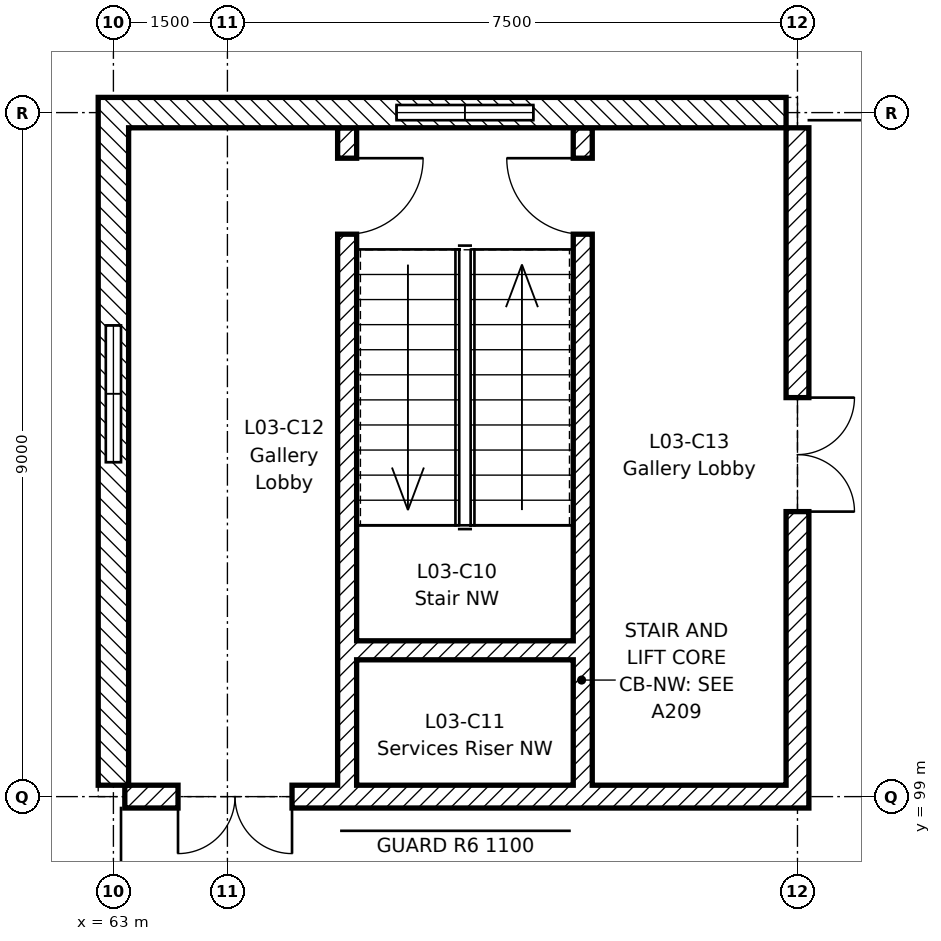
"""IFC4 building model, lengths in metres.
Left out: names, types, materials, properties, quantities, classifications, styles, units other than length and angle.
Written with IfcOpenShell. Run it as: python <this file> out.ifc"""

import sys

from ifc_helpers import new_model, si_unit, direction, frame, frame_2d, origin, place, context, subcontext, project, spatial, rectangle, extrude, element, fill, save


model = new_model("IFC4")
c1 = context("Model", 3, precision=1e-05, world=origin(), true_north=direction((0.0, 1.0)))
c2 = subcontext(c1, "Body", "Model", "MODEL_VIEW")
j1 = project(units=[si_unit("LENGTHUNIT", "METRE"), si_unit("PLANEANGLEUNIT", "RADIAN")], contexts=[c1])
p1 = place(None, origin())
s1 = spatial("IfcSite", under=j1, at=p1, CompositionType="ELEMENT")
p2 = place(p1, origin())
s2 = spatial("IfcBuilding", under=s1, at=p2, CompositionType="ELEMENT")
p3 = place(p2, frame((0.0, 0.0, 14.4)))
s3 = spatial("IfcBuildingStorey", under=s2, at=p3, CompositionType="ELEMENT", Elevation=14.4)
p4 = place(p3, frame((75.322, 98.657, -0.2), z_axis=(0.0, 0.0, 1.0), x_axis=(-0.707106781187, -0.707106781187, 0.0)))
e1 = element("IfcWall", 1, at=p4, inside=s3, PredefinedType="SHEAR", context=c2, shape_type="SweptSolid", body=[
    extrude(rectangle(XDim=4.213, YDim=1.0, at=frame_2d((2.106, 0.0))), origin(), (0.0, 0.0, 1.0), 4.2),
])
p5 = place(p4, frame((1.356, 0.0, 0.2)))
e2 = element("IfcOpeningElement", 2, at=p5, cuts=e1, PredefinedType="OPENING", context=c2, shape_type="SweptSolid", body=[
    extrude(rectangle(XDim=1.5, YDim=2.4, at=frame_2d((0.75, 1.2))), frame((0.0, 0.51, 0.0), z_axis=(0.0, -1.0, 0.0), x_axis=(1.0, 0.0, 0.0)), (0.0, 0.0, 1.0), 1.02),
])
p6 = place(p3, frame((63.15, 99.0, 0.0), z_axis=(0.0, 0.0, 1.0), x_axis=(1.0, 0.0, 0.0)))
e3 = element("IfcWall", 3, at=p6, inside=s3, PredefinedType="SHEAR", context=c2, shape_type="SweptSolid", body=[
    extrude(rectangle(XDim=9.0, YDim=0.3, at=frame_2d((4.5, 0.0))), origin(), (0.0, 0.0, 1.0), 4.0),
])
p7 = place(p6, frame((0.7, 0.0, 0.0)))
e4 = element("IfcOpeningElement", 4, at=p7, cuts=e3, PredefinedType="OPENING", context=c2, shape_type="SweptSolid", body=[
    extrude(rectangle(XDim=1.5, YDim=2.4, at=frame_2d((0.75, 1.2))), frame((0.0, 0.16, 0.0), z_axis=(0.0, -1.0, 0.0), x_axis=(1.0, 0.0, 0.0)), (0.0, 0.0, 1.0), 0.32),
])
p8 = place(p3, frame((72.0, 107.8, 0.0), z_axis=(0.0, 0.0, 1.0), x_axis=(0.0, -1.0, 0.0)))
e5 = element("IfcWall", 5, at=p8, inside=s3, PredefinedType="SHEAR", context=c2, shape_type="SweptSolid", body=[
    extrude(rectangle(XDim=8.65, YDim=0.3, at=frame_2d((4.325, 0.0))), origin(), (0.0, 0.0, 1.0), 4.0),
])
p9 = place(p8, frame((3.55, 0.0, 0.0)))
e6 = element("IfcOpeningElement", 6, at=p9, cuts=e5, PredefinedType="OPENING", context=c2, shape_type="SweptSolid", body=[
    extrude(rectangle(XDim=1.5, YDim=2.4, at=frame_2d((0.75, 1.2))), frame((0.0, 0.16, 0.0), z_axis=(0.0, -1.0, 0.0), x_axis=(1.0, 0.0, 0.0)), (0.0, 0.0, 1.0), 0.32),
])
p10 = place(p3, frame((66.075, 107.8, 0.0), z_axis=(0.0, 0.0, 1.0), x_axis=(0.0, -1.0, 0.0)))
e7 = element("IfcWall", 7, at=p10, inside=s3, PredefinedType="SHEAR", context=c2, shape_type="SweptSolid", body=[
    extrude(rectangle(XDim=8.65, YDim=0.25, at=frame_2d((4.325, 0.0))), origin(), (0.0, 0.0, 1.0), 4.0),
])
p11 = place(p10, frame((0.4, 0.0, 0.0)))
e8 = element("IfcOpeningElement", 8, at=p11, cuts=e7, PredefinedType="OPENING", context=c2, shape_type="SweptSolid", body=[
    extrude(rectangle(XDim=1.0, YDim=2.1, at=frame_2d((0.5, 1.05))), frame((0.0, 0.135, 0.0), z_axis=(0.0, -1.0, 0.0), x_axis=(1.0, 0.0, 0.0)), (0.0, 0.0, 1.0), 0.27),
])
p12 = place(p3, frame((69.175, 107.8, 0.0), z_axis=(0.0, 0.0, 1.0), x_axis=(0.0, -1.0, 0.0)))
e9 = element("IfcWall", 9, at=p12, inside=s3, PredefinedType="SHEAR", context=c2, shape_type="SweptSolid", body=[
    extrude(rectangle(XDim=8.65, YDim=0.25, at=frame_2d((4.325, 0.0))), origin(), (0.0, 0.0, 1.0), 4.0),
])
p13 = place(p12, frame((0.4, 0.0, 0.0)))
e10 = element("IfcOpeningElement", 10, at=p13, cuts=e9, PredefinedType="OPENING", context=c2, shape_type="SweptSolid", body=[
    extrude(rectangle(XDim=1.0, YDim=2.1, at=frame_2d((0.5, 1.05))), frame((0.0, 0.135, 0.0), z_axis=(0.0, -1.0, 0.0), x_axis=(1.0, 0.0, 0.0)), (0.0, 0.0, 1.0), 0.27),
])
p14 = place(p3, frame((66.2, 100.925, 0.0), z_axis=(0.0, 0.0, 1.0), x_axis=(1.0, 0.0, 0.0)))
e11 = element("IfcWall", 11, at=p14, inside=s3, PredefinedType="SHEAR", context=c2, shape_type="SweptSolid", body=[
    extrude(rectangle(XDim=2.85, YDim=0.25, at=frame_2d((1.425, 0.0))), origin(), (0.0, 0.0, 1.0), 4.0),
])
p15 = place(p3, frame((62.8, 108.0, 0.0), z_axis=(0.0, 0.0, 1.0), x_axis=(1.0, 0.0, 0.0)))
e12 = element("IfcWall", 12, at=p15, inside=s3, PredefinedType="STANDARD", context=c2, shape_type="SweptSolid", body=[
    extrude(rectangle(XDim=3.925, YDim=0.4, at=frame_2d((1.962, 0.0))), origin(), (0.0, 0.0, 1.0), 4.0),
])
p16 = place(p3, frame((68.525, 108.0, 0.0), z_axis=(0.0, 0.0, 1.0), x_axis=(1.0, 0.0, 0.0)))
e13 = element("IfcWall", 13, at=p16, inside=s3, PredefinedType="STANDARD", context=c2, shape_type="SweptSolid", body=[
    extrude(rectangle(XDim=3.325, YDim=0.4, at=frame_2d((1.663, 0.0))), origin(), (0.0, 0.0, 1.0), 4.0),
])
p17 = place(p3, frame((66.725, 108.0, 0.0), z_axis=(0.0, 0.0, 1.0), x_axis=(1.0, 0.0, 0.0)))
e14 = element("IfcWall", 14, at=p17, inside=s3, PredefinedType="STANDARD", context=c2, shape_type="SweptSolid", body=[
    extrude(rectangle(XDim=1.8, YDim=0.4, at=frame_2d((0.9, 0.0))), origin(), (0.0, 0.0, 1.0), 0.9),
])
p18 = place(p3, frame((63.0, 99.15, 0.0), z_axis=(0.0, 0.0, 1.0), x_axis=(0.0, 1.0, 0.0)))
e15 = element("IfcWall", 15, at=p18, inside=s3, PredefinedType="STANDARD", context=c2, shape_type="SweptSolid", body=[
    extrude(rectangle(XDim=4.25, YDim=0.4, at=frame_2d((2.125, 0.0))), origin(), (0.0, 0.0, 1.0), 4.0),
])
p19 = place(p3, frame((63.0, 105.2, 0.0), z_axis=(0.0, 0.0, 1.0), x_axis=(0.0, 1.0, 0.0)))
e16 = element("IfcWall", 16, at=p19, inside=s3, PredefinedType="STANDARD", context=c2, shape_type="SweptSolid", body=[
    extrude(rectangle(XDim=2.6, YDim=0.4, at=frame_2d((1.3, 0.0))), origin(), (0.0, 0.0, 1.0), 4.0),
])
p20 = place(p3, frame((63.0, 103.4, 0.0), z_axis=(0.0, 0.0, 1.0), x_axis=(0.0, 1.0, 0.0)))
e17 = element("IfcWall", 17, at=p20, inside=s3, PredefinedType="STANDARD", context=c2, shape_type="SweptSolid", body=[
    extrude(rectangle(XDim=1.8, YDim=0.4, at=frame_2d((0.9, 0.0))), origin(), (0.0, 0.0, 1.0), 0.9),
])
p21 = place(p11, origin())
e18 = element("IfcDoor", 18, at=p21, inside=s3, OperationType="SINGLE_SWING_LEFT", PredefinedType="DOOR", context=c2, shape_type="SweptSolid", body=[
    extrude(rectangle(XDim=1.0, YDim=2.1, at=frame_2d((0.5, 1.05))), frame((0.0, 0.025, 0.0), z_axis=(0.0, -1.0, 0.0), x_axis=(1.0, 0.0, 0.0)), (0.0, 0.0, 1.0), 0.05),
])
fill(e8, e18)
p22 = place(p7, frame((1.5, 0.0, 0.0), z_axis=(0.0, 0.0, 1.0), x_axis=(-1.0, 0.0, 0.0)))
e19 = element("IfcDoor", 19, at=p22, inside=s3, OperationType="DOUBLE_DOOR_SINGLE_SWING", PredefinedType="DOOR", context=c2, shape_type="SweptSolid", body=[
    extrude(rectangle(XDim=1.5, YDim=2.4, at=frame_2d((0.75, 1.2))), frame((0.0, 0.025, 0.0), z_axis=(0.0, -1.0, 0.0), x_axis=(1.0, 0.0, 0.0)), (0.0, 0.0, 1.0), 0.05),
])
fill(e4, e19)
p23 = place(p9, origin())
e20 = element("IfcDoor", 20, at=p23, inside=s3, OperationType="DOUBLE_DOOR_SINGLE_SWING", PredefinedType="DOOR", context=c2, shape_type="SweptSolid", body=[
    extrude(rectangle(XDim=1.5, YDim=2.4, at=frame_2d((0.75, 1.2))), frame((0.0, 0.025, 0.0), z_axis=(0.0, -1.0, 0.0), x_axis=(1.0, 0.0, 0.0)), (0.0, 0.0, 1.0), 0.05),
])
fill(e6, e20)
p24 = place(p13, frame((1.0, 0.0, 0.0), z_axis=(0.0, 0.0, 1.0), x_axis=(-1.0, 0.0, 0.0)))
e21 = element("IfcDoor", 21, at=p24, inside=s3, OperationType="SINGLE_SWING_RIGHT", PredefinedType="DOOR", context=c2, shape_type="SweptSolid", body=[
    extrude(rectangle(XDim=1.0, YDim=2.1, at=frame_2d((0.5, 1.05))), frame((0.0, 0.025, 0.0), z_axis=(0.0, -1.0, 0.0), x_axis=(1.0, 0.0, 0.0)), (0.0, 0.0, 1.0), 0.05),
])
fill(e10, e21)
save(model, sys.argv[1])
